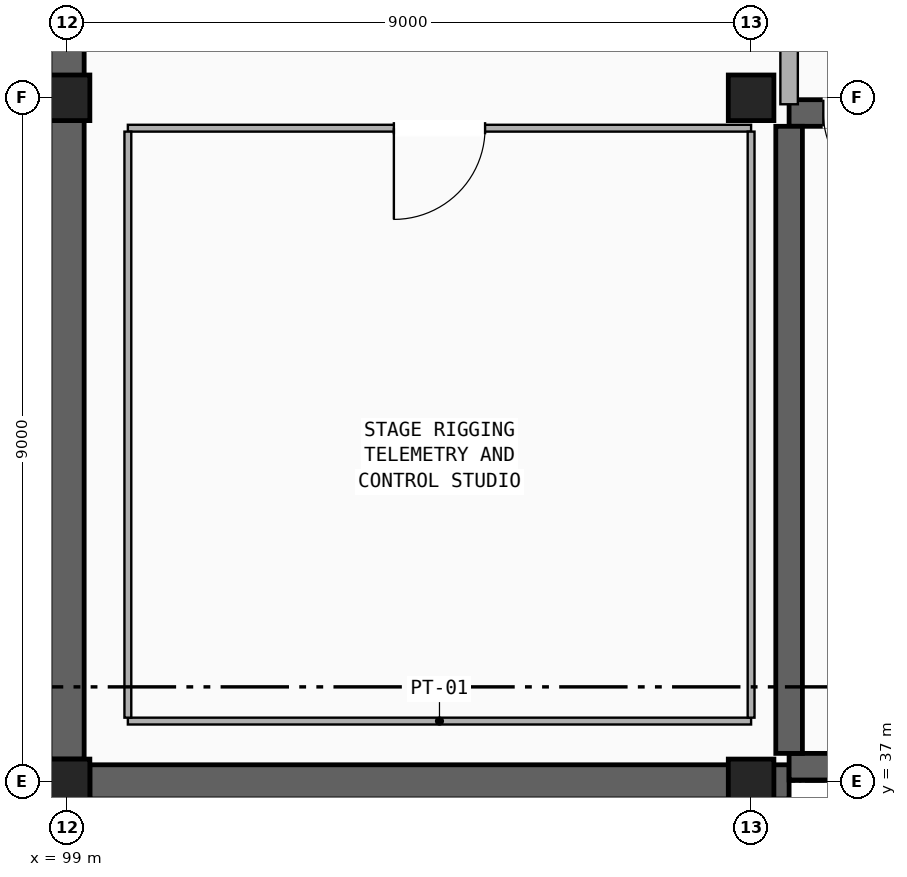
"""IFC4 building model, lengths in metres.
Left out: names, types, materials, properties, quantities, classifications, styles, units other than length and angle.
Written with IfcOpenShell. Run it as: python <this file> out.ifc"""

import sys

from ifc_helpers import new_model, si_unit, direction, frame, frame_2d, origin, origin_2d, place, context, subcontext, project, spatial, polyline, rectangle, outline, extrude, element, fill, save


model = new_model("IFC4")
c1 = context("Model", 3, precision=1e-05, world=origin(), true_north=direction((0.0, 1.0)))
c2 = subcontext(c1, "Body", "Model", "MODEL_VIEW")
j1 = project(units=[si_unit("LENGTHUNIT", "METRE"), si_unit("PLANEANGLEUNIT", "RADIAN")], contexts=[c1])
p1 = place(None, origin())
s1 = spatial("IfcSite", under=j1, at=p1, CompositionType="ELEMENT")
p2 = place(p1, origin())
s2 = spatial("IfcBuilding", under=s1, at=p2, CompositionType="ELEMENT")
p3 = place(p2, frame((0.0, 0.0, 21.76)))
s3 = spatial("IfcBuildingStorey", under=s2, at=p3, CompositionType="ELEMENT", Elevation=21.76)
p4 = place(p3, frame((99.0, 37.0, 0.0), z_axis=(0.0, 0.0, 1.0), x_axis=(1.0, 0.0, 0.0)))
e1 = element("IfcColumn", 1, at=p4, inside=s3, PredefinedType="COLUMN", context=c2, shape_type="SweptSolid", body=[
    extrude(rectangle(XDim=0.6, YDim=0.6, at=origin_2d()), origin(), (0.0, 0.0, 1.0), 9.0),
])
p5 = place(p3, frame((99.0, 46.0, 0.0), z_axis=(0.0, 0.0, 1.0), x_axis=(1.0, 0.0, 0.0)))
e2 = element("IfcColumn", 2, at=p5, inside=s3, PredefinedType="COLUMN", context=c2, shape_type="SweptSolid", body=[
    extrude(rectangle(XDim=0.6, YDim=0.6, at=origin_2d()), origin(), (0.0, 0.0, 1.0), 8.217),
])
for number, where, z_axis, x_axis in (
    (3, (108.0, 37.0, 0.0), (0.0, 0.0, 1.0), (1.0, 0.0, 0.0)),
    (4, (108.0, 46.0, 0.0), (0.0, 0.0, 1.0), (1.0, 0.0, 0.0)),
):
    element("IfcColumn", number, at=place(p3, frame(where, z_axis=z_axis, x_axis=x_axis)), inside=s3, PredefinedType="COLUMN", context=c2, shape_type="SweptSolid", body=[
        extrude(rectangle(XDim=0.6, YDim=0.6, at=origin_2d()), origin(), (0.0, 0.0, 1.0), 9.0),
    ])
p6 = place(p3, frame((99.3, 37.0, 0.0), z_axis=(0.0, 0.0, 1.0), x_axis=(1.0, 0.0, 0.0)))
e5 = element("IfcWall", 5, at=p6, inside=s3, PredefinedType="SHEAR", context=c2, shape_type="SweptSolid", body=[
    extrude(outline(polyline([(0.0, 0.0), (9.2, 0.0), (9.2, 11.285), (0.0, 12.791), (0.0, 0.0)])), frame((0.0, 0.225, 0.0), z_axis=(0.0, -1.0, 0.0), x_axis=(1.0, 0.0, 0.0)), (0.0, 0.0, 1.0), 0.45),
])
p7 = place(p3, frame((99.0, 37.3, 0.0), z_axis=(0.0, 0.0, 1.0), x_axis=(0.0, 1.0, 0.0)))
e6 = element("IfcWall", 6, at=p7, inside=s3, PredefinedType="SHEAR", context=c2, shape_type="SweptSolid", body=[
    extrude(rectangle(XDim=37.4, YDim=0.45, at=frame_2d((18.7, 0.0))), origin(), (0.0, 0.0, 1.0), 12.84),
])
p8 = place(p3, frame((108.5, 37.2, 0.0), z_axis=(0.0, 0.0, 1.0), x_axis=(1.0, 0.0, 0.0)))
e7 = element("IfcWall", 7, at=p8, inside=s3, PredefinedType="SHEAR", context=c2, shape_type="SweptSolid", body=[
    extrude(rectangle(XDim=10.3, YDim=0.35, at=frame_2d((5.15, 0.0))), origin(), (0.0, 0.0, 1.0), 9.78),
])
p9 = place(p3, frame((108.5, 45.8, 0.0), z_axis=(0.0, 0.0, 1.0), x_axis=(1.0, 0.0, 0.0)))
e8 = element("IfcWall", 8, at=p9, inside=s3, PredefinedType="SHEAR", context=c2, shape_type="SweptSolid", body=[
    extrude(rectangle(XDim=10.3, YDim=0.35, at=frame_2d((5.15, 0.0))), origin(), (0.0, 0.0, 1.0), 9.78),
])
p10 = place(p9, frame((0.45, 0.0, 0.0)))
e9 = element("IfcOpeningElement", 9, at=p10, cuts=e8, PredefinedType="OPENING", context=c2, shape_type="SweptSolid", body=[
    extrude(rectangle(XDim=1.1, YDim=2.2, at=frame_2d((0.55, 1.1))), frame((0.0, 0.185, 0.0), z_axis=(0.0, -1.0, 0.0), x_axis=(1.0, 0.0, 0.0)), (0.0, 0.0, 1.0), 0.37),
])
p11 = place(p3, frame((108.5, 37.375, 0.0), z_axis=(0.0, 0.0, 1.0), x_axis=(0.0, 1.0, 0.0)))
e10 = element("IfcWall", 10, at=p11, inside=s3, PredefinedType="SHEAR", context=c2, shape_type="SweptSolid", body=[
    extrude(rectangle(XDim=8.25, YDim=0.35, at=frame_2d((4.125, 0.0))), origin(), (0.0, 0.0, 1.0), 9.78),
])
p12 = place(p3, frame((108.5, 45.915, 0.0), z_axis=(0.0, 0.0, 1.0), x_axis=(0.0, 1.0, 0.0)))
e11 = element("IfcWall", 11, at=p12, inside=s3, PredefinedType="PARTITIONING", context=c2, shape_type="SweptSolid", body=[
    extrude(rectangle(XDim=3.77, YDim=0.23, at=frame_2d((1.885, 0.0))), origin(), (0.0, 0.0, 1.0), 8.78),
])
p13 = place(p3, frame((99.8, 37.8, 0.0), z_axis=(0.0, 0.0, 1.0), x_axis=(1.0, 0.0, 0.0)))
e12 = element("IfcWall", 12, at=p13, inside=s3, PredefinedType="PARTITIONING", context=c2, shape_type="SweptSolid", body=[
    extrude(rectangle(XDim=8.2, YDim=0.09, at=frame_2d((4.1, 0.0))), origin(), (0.0, 0.0, 1.0), 7.92),
])
p14 = place(p3, frame((99.8, 45.6, 0.0), z_axis=(0.0, 0.0, 1.0), x_axis=(1.0, 0.0, 0.0)))
e13 = element("IfcWall", 13, at=p14, inside=s3, PredefinedType="PARTITIONING", context=c2, shape_type="SweptSolid", body=[
    extrude(rectangle(XDim=8.2, YDim=0.09, at=frame_2d((4.1, 0.0))), origin(), (0.0, 0.0, 1.0), 7.92),
])
p15 = place(p14, frame((3.5, 0.0, 0.0)))
e14 = element("IfcOpeningElement", 14, at=p15, cuts=e13, PredefinedType="OPENING", context=c2, shape_type="SweptSolid", body=[
    extrude(rectangle(XDim=1.2, YDim=2.2, at=frame_2d((0.6, 1.1))), frame((0.0, 0.055, 0.0), z_axis=(0.0, -1.0, 0.0), x_axis=(1.0, 0.0, 0.0)), (0.0, 0.0, 1.0), 0.11),
])
p16 = place(p3, frame((99.8, 37.845, 0.0), z_axis=(0.0, 0.0, 1.0), x_axis=(0.0, 1.0, 0.0)))
e15 = element("IfcWall", 15, at=p16, inside=s3, PredefinedType="PARTITIONING", context=c2, shape_type="SweptSolid", body=[
    extrude(rectangle(XDim=7.71, YDim=0.09, at=frame_2d((3.855, 0.0))), origin(), (0.0, 0.0, 1.0), 8.78),
])
p17 = place(p3, frame((108.0, 37.845, 0.0), z_axis=(0.0, 0.0, 1.0), x_axis=(0.0, 1.0, 0.0)))
e16 = element("IfcWall", 16, at=p17, inside=s3, PredefinedType="PARTITIONING", context=c2, shape_type="SweptSolid", body=[
    extrude(rectangle(XDim=7.71, YDim=0.09, at=frame_2d((3.855, 0.0))), origin(), (0.0, 0.0, 1.0), 7.92),
])
p18 = place(p10, frame((1.1, 0.0, 0.0), z_axis=(0.0, 0.0, 1.0), x_axis=(-1.0, 0.0, 0.0)))
e17 = element("IfcDoor", 17, at=p18, inside=s3, OperationType="SINGLE_SWING_LEFT", PredefinedType="DOOR", context=c2, shape_type="SweptSolid", body=[
    extrude(rectangle(XDim=1.1, YDim=2.2, at=frame_2d((0.55, 1.1))), frame((0.0, 0.025, 0.0), z_axis=(0.0, -1.0, 0.0), x_axis=(1.0, 0.0, 0.0)), (0.0, 0.0, 1.0), 0.05),
])
fill(e9, e17)
p19 = place(p15, frame((1.2, 0.0, 0.0), z_axis=(0.0, 0.0, 1.0), x_axis=(-1.0, 0.0, 0.0)))
e18 = element("IfcDoor", 18, at=p19, inside=s3, OperationType="SINGLE_SWING_RIGHT", PredefinedType="DOOR", context=c2, shape_type="SweptSolid", body=[
    extrude(rectangle(XDim=1.2, YDim=2.2, at=frame_2d((0.6, 1.1))), frame((0.0, 0.025, 0.0), z_axis=(0.0, -1.0, 0.0), x_axis=(1.0, 0.0, 0.0)), (0.0, 0.0, 1.0), 0.05),
])
fill(e14, e18)
save(model, sys.argv[1])
